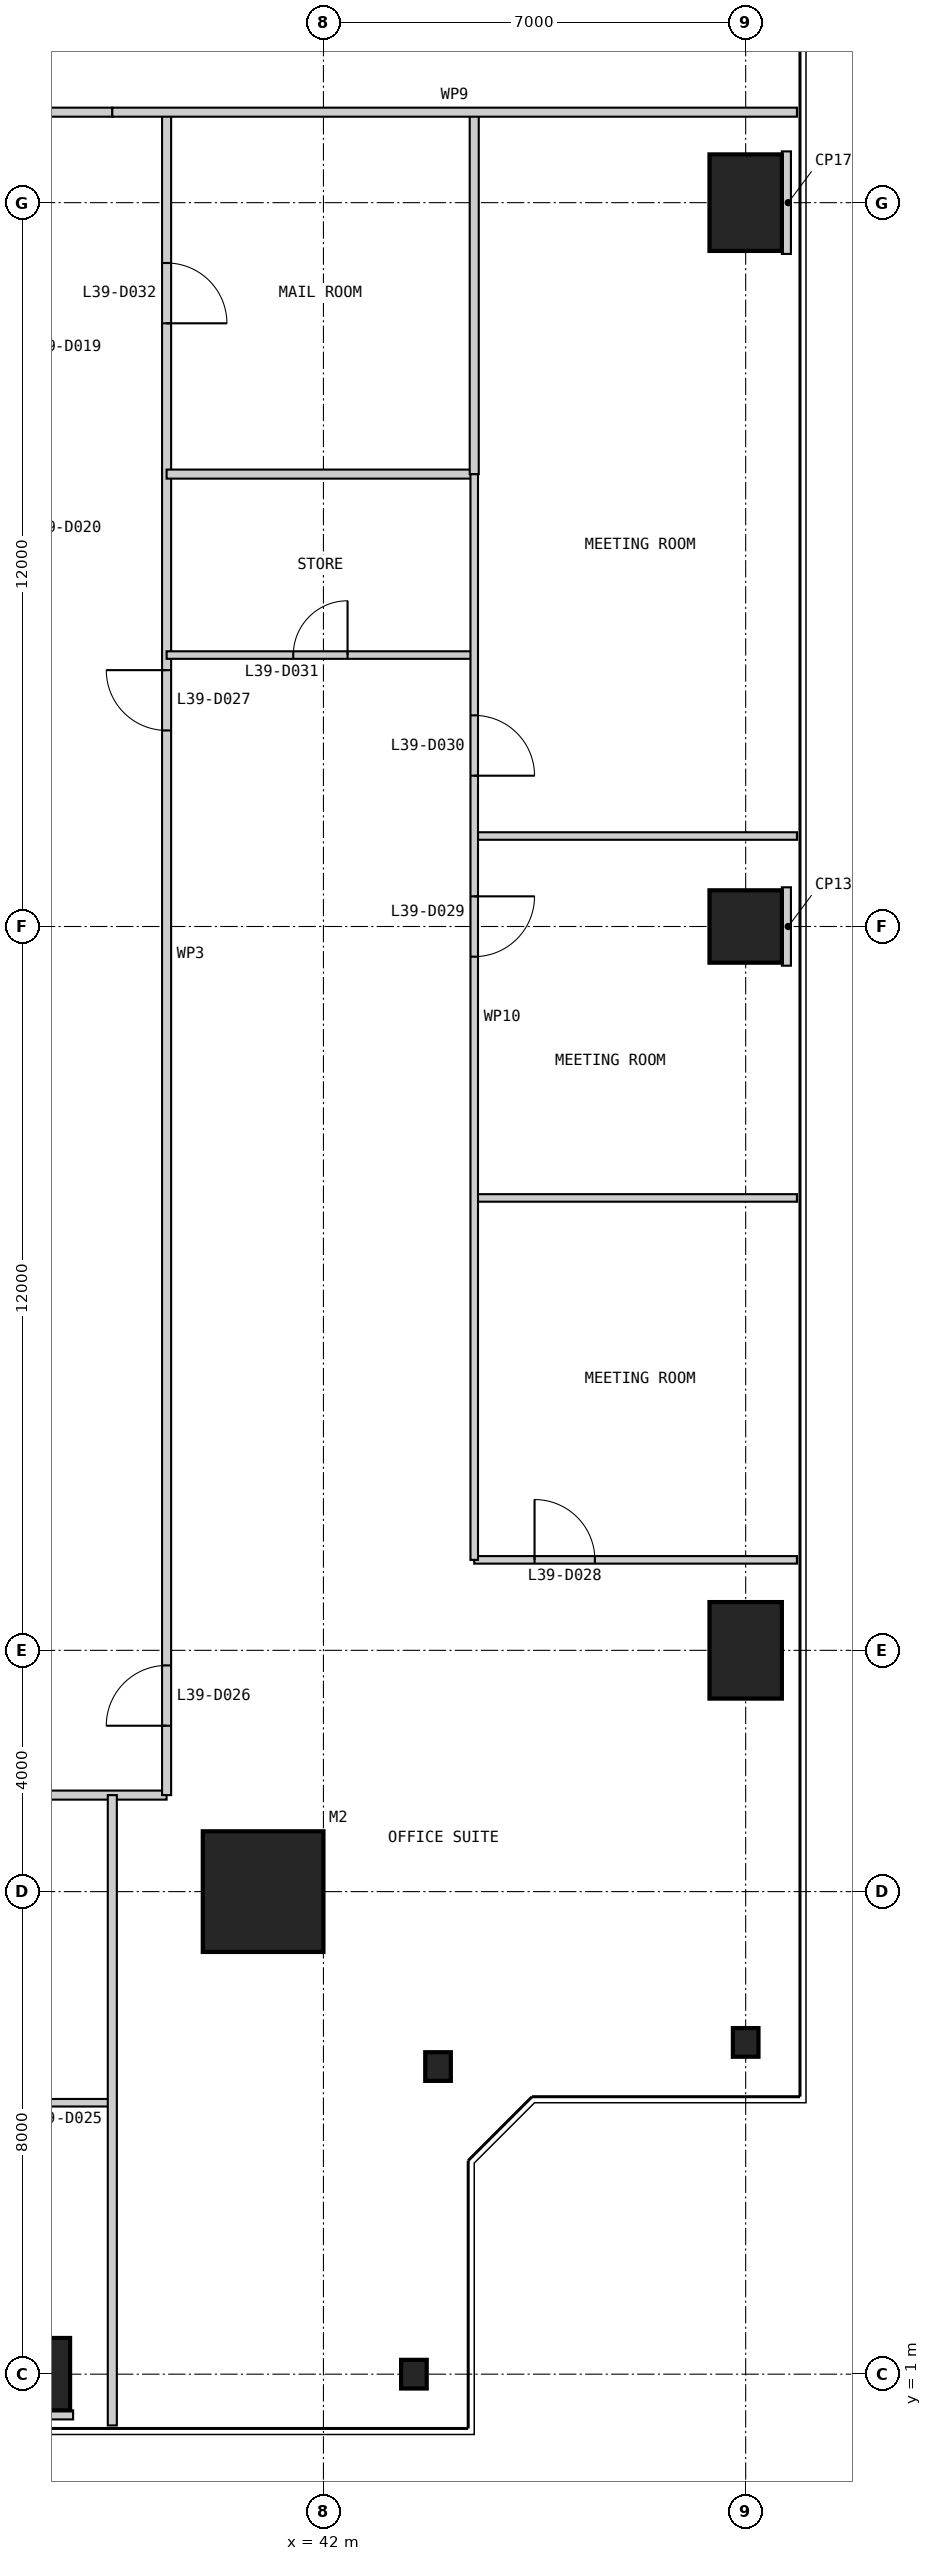
"""IFC4 building model, lengths in metres.
Left out: names, types, materials, properties, quantities, classifications, styles, units other than length and angle.
Written with IfcOpenShell. Run it as: python <this file> out.ifc"""

import sys

from ifc_helpers import new_model, si_unit, direction, frame, frame_2d, origin, origin_2d, place, context, subcontext, project, spatial, rectangle, i_section, extrude, element, fill, save


model = new_model("IFC4")
c1 = context("Model", 3, precision=1e-05, world=origin(), true_north=direction((0.0, 1.0)))
c2 = subcontext(c1, "Body", "Model", "MODEL_VIEW")
j1 = project(units=[si_unit("LENGTHUNIT", "METRE"), si_unit("PLANEANGLEUNIT", "RADIAN")], contexts=[c1])
p1 = place(None, origin())
s1 = spatial("IfcSite", under=j1, at=p1, CompositionType="ELEMENT")
p2 = place(p1, origin())
s2 = spatial("IfcBuilding", under=s1, at=p2, CompositionType="ELEMENT")
p3 = place(p2, frame((0.0, 0.0, 168.4)))
s3 = spatial("IfcBuildingStorey", under=s2, at=p3, CompositionType="ELEMENT", Elevation=168.4)
p4 = place(p3, frame((41.0, 9.0, 0.0), z_axis=(0.0, 0.0, 1.0), x_axis=(1.0, 0.0, 0.0)))
e1 = element("IfcColumn", 1, at=p4, inside=s3, PredefinedType="COLUMN", context=c2, shape_type="SweptSolid", body=[
    extrude(rectangle(XDim=2.0, YDim=2.0, at=origin_2d()), origin(), (0.0, 0.0, 1.0), 5.4),
])
p5 = place(p3, frame((37.0, 1.0, 0.0), z_axis=(0.0, 0.0, 1.0), x_axis=(1.0, 0.0, 0.0)))
e2 = element("IfcColumn", 2, at=p5, inside=s3, PredefinedType="COLUMN", context=c2, shape_type="SweptSolid", body=[
    extrude(rectangle(XDim=1.6, YDim=1.2, at=origin_2d()), origin(), (0.0, 0.0, 1.0), 5.4),
])
for number, where, z_axis, x_axis in (
    (3, (43.5, 1.0, 0.0), (0.0, 0.0, 1.0), (1.0, 0.0, 0.0)),
    (4, (43.9, 6.1, 0.0), (0.0, 0.0, 1.0), (1.0, 0.0, 0.0)),
    (5, (49.0, 6.5, 0.0), (0.0, 0.0, 1.0), (1.0, 0.0, 0.0)),
):
    element("IfcColumn", number, at=place(p3, frame(where, z_axis=z_axis, x_axis=x_axis)), inside=s3, PredefinedType="COLUMN", context=c2, shape_type="SweptSolid", body=[
        extrude(i_section(OverallWidth=0.424, OverallDepth=0.475, WebThickness=0.048, FlangeThickness=0.077, at=origin_2d()), origin(), (0.0, 0.0, 1.0), 5.4),
    ])
p6 = place(p3, frame((49.0, 13.0, 0.0), z_axis=(0.0, 0.0, 1.0), x_axis=(1.0, 0.0, 0.0)))
e6 = element("IfcColumn", 6, at=p6, inside=s3, PredefinedType="COLUMN", context=c2, shape_type="SweptSolid", body=[
    extrude(rectangle(XDim=1.2, YDim=1.6, at=origin_2d()), origin(), (0.0, 0.0, 1.0), 5.4),
])
p7 = place(p3, frame((49.0, 25.0, 0.0), z_axis=(0.0, 0.0, 1.0), x_axis=(1.0, 0.0, 0.0)))
e7 = element("IfcColumn", 7, at=p7, inside=s3, PredefinedType="COLUMN", context=c2, shape_type="SweptSolid", body=[
    extrude(rectangle(XDim=1.2, YDim=1.2, at=origin_2d()), origin(), (0.0, 0.0, 1.0), 5.4),
])
p8 = place(p3, frame((49.0, 37.0, 0.0), z_axis=(0.0, 0.0, 1.0), x_axis=(1.0, 0.0, 0.0)))
e8 = element("IfcColumn", 8, at=p8, inside=s3, PredefinedType="COLUMN", context=c2, shape_type="SweptSolid", body=[
    extrude(rectangle(XDim=1.2, YDim=1.6, at=origin_2d()), origin(), (0.0, 0.0, 1.0), 5.4),
])
p9 = place(p3, frame((10.6, 10.6, 0.0), z_axis=(0.0, 0.0, 1.0), x_axis=(1.0, 0.0, 0.0)))
e9 = element("IfcWall", 9, at=p9, inside=s3, PredefinedType="PARTITIONING", context=c2, shape_type="SweptSolid", body=[
    extrude(rectangle(XDim=28.8, YDim=0.15, at=frame_2d((14.4, 0.0))), origin(), (0.0, 0.0, 1.0), 5.25),
])
p10 = place(p9, frame((1.15, 0.0, 0.0)))
e10 = element("IfcOpeningElement", 10, at=p10, cuts=e9, PredefinedType="OPENING", context=c2, shape_type="SweptSolid", body=[
    extrude(rectangle(XDim=1.0, YDim=2.2, at=frame_2d((0.5, 1.1))), frame((0.0, 0.085, 0.0), z_axis=(0.0, -1.0, 0.0), x_axis=(1.0, 0.0, 0.0)), (0.0, 0.0, 1.0), 0.17),
])
p11 = place(p9, frame((11.65, 0.0, 0.0)))
e11 = element("IfcOpeningElement", 11, at=p11, cuts=e9, PredefinedType="OPENING", context=c2, shape_type="SweptSolid", body=[
    extrude(rectangle(XDim=1.0, YDim=2.2, at=frame_2d((0.5, 1.1))), frame((0.0, 0.085, 0.0), z_axis=(0.0, -1.0, 0.0), x_axis=(1.0, 0.0, 0.0)), (0.0, 0.0, 1.0), 0.17),
])
p12 = place(p9, frame((16.9, 0.0, 0.0)))
e12 = element("IfcOpeningElement", 12, at=p12, cuts=e9, PredefinedType="OPENING", context=c2, shape_type="SweptSolid", body=[
    extrude(rectangle(XDim=1.0, YDim=2.2, at=frame_2d((0.5, 1.1))), frame((0.0, 0.085, 0.0), z_axis=(0.0, -1.0, 0.0), x_axis=(1.0, 0.0, 0.0)), (0.0, 0.0, 1.0), 0.17),
])
p13 = place(p3, frame((32.5, 5.5, 0.0), z_axis=(0.0, 0.0, 1.0), x_axis=(1.0, 0.0, 0.0)))
e13 = element("IfcWall", 13, at=p13, inside=s3, PredefinedType="PARTITIONING", context=c2, shape_type="SweptSolid", body=[
    extrude(rectangle(XDim=6.0, YDim=0.125, at=frame_2d((3.0, 0.0))), origin(), (0.0, 0.0, 1.0), 5.25),
])
p14 = place(p13, frame((4.05, 0.0, 0.0)))
e14 = element("IfcOpeningElement", 14, at=p14, cuts=e13, PredefinedType="OPENING", context=c2, shape_type="SweptSolid", body=[
    extrude(rectangle(XDim=0.9, YDim=2.2, at=frame_2d((0.45, 1.1))), frame((0.0, 0.073, 0.0), z_axis=(0.0, -1.0, 0.0), x_axis=(1.0, 0.0, 0.0)), (0.0, 0.0, 1.0), 0.145),
])
p15 = place(p3, frame((39.4, 10.6, 0.0), z_axis=(0.0, 0.0, 1.0), x_axis=(0.0, 1.0, 0.0)))
e15 = element("IfcWall", 15, at=p15, inside=s3, PredefinedType="PARTITIONING", context=c2, shape_type="SweptSolid", body=[
    extrude(rectangle(XDim=27.9, YDim=0.15, at=frame_2d((13.95, 0.0))), origin(), (0.0, 0.0, 1.0), 5.25),
])
p16 = place(p15, frame((1.15, 0.0, 0.0)))
e16 = element("IfcOpeningElement", 16, at=p16, cuts=e15, PredefinedType="OPENING", context=c2, shape_type="SweptSolid", body=[
    extrude(rectangle(XDim=1.0, YDim=2.2, at=frame_2d((0.5, 1.1))), frame((0.0, 0.085, 0.0), z_axis=(0.0, -1.0, 0.0), x_axis=(1.0, 0.0, 0.0)), (0.0, 0.0, 1.0), 0.17),
])
p17 = place(p15, frame((17.65, 0.0, 0.0)))
e17 = element("IfcOpeningElement", 17, at=p17, cuts=e15, PredefinedType="OPENING", context=c2, shape_type="SweptSolid", body=[
    extrude(rectangle(XDim=1.0, YDim=2.2, at=frame_2d((0.5, 1.1))), frame((0.0, 0.085, 0.0), z_axis=(0.0, -1.0, 0.0), x_axis=(1.0, 0.0, 0.0)), (0.0, 0.0, 1.0), 0.17),
])
p18 = place(p15, frame((24.4, 0.0, 0.0)))
e18 = element("IfcOpeningElement", 18, at=p18, cuts=e15, PredefinedType="OPENING", context=c2, shape_type="SweptSolid", body=[
    extrude(rectangle(XDim=1.0, YDim=2.2, at=frame_2d((0.5, 1.1))), frame((0.0, 0.085, 0.0), z_axis=(0.0, -1.0, 0.0), x_axis=(1.0, 0.0, 0.0)), (0.0, 0.0, 1.0), 0.17),
])
p19 = place(p3, frame((38.5, 0.15, 0.0), z_axis=(0.0, 0.0, 1.0), x_axis=(0.0, 1.0, 0.0)))
e19 = element("IfcWall", 19, at=p19, inside=s3, PredefinedType="PARTITIONING", context=c2, shape_type="SweptSolid", body=[
    extrude(rectangle(XDim=10.45, YDim=0.15, at=frame_2d((5.225, 0.0))), origin(), (0.0, 0.0, 1.0), 5.25),
])
p20 = place(p3, frame((49.85, 14.5, 0.0), z_axis=(0.0, 0.0, 1.0), x_axis=(-1.0, 0.0, 0.0)))
e20 = element("IfcWall", 20, at=p20, inside=s3, PredefinedType="PARTITIONING", context=c2, shape_type="SweptSolid", body=[
    extrude(rectangle(XDim=5.35, YDim=0.125, at=frame_2d((2.675, 0.0))), origin(), (0.0, 0.0, 1.0), 5.25),
])
p21 = place(p20, frame((3.35, 0.0, 0.0)))
e21 = element("IfcOpeningElement", 21, at=p21, cuts=e20, PredefinedType="OPENING", context=c2, shape_type="SweptSolid", body=[
    extrude(rectangle(XDim=1.0, YDim=2.2, at=frame_2d((0.5, 1.1))), frame((0.0, 0.073, 0.0), z_axis=(0.0, -1.0, 0.0), x_axis=(1.0, 0.0, 0.0)), (0.0, 0.0, 1.0), 0.145),
])
for number, where, z_axis, x_axis in (
    (22, (49.85, 20.5, 0.0), (0.0, 0.0, 1.0), (-1.0, 0.0, 0.0)),
    (23, (49.85, 26.5, 0.0), (0.0, 0.0, 1.0), (-1.0, 0.0, 0.0)),
):
    element("IfcWall", number, at=place(p3, frame(where, z_axis=z_axis, x_axis=x_axis)), inside=s3, PredefinedType="PARTITIONING", context=c2, shape_type="SweptSolid", body=[
        extrude(rectangle(XDim=5.35, YDim=0.125, at=frame_2d((2.675, 0.0))), origin(), (0.0, 0.0, 1.0), 5.25),
    ])
p22 = place(p3, frame((44.5, 29.5, 0.0), z_axis=(0.0, 0.0, 1.0), x_axis=(-1.0, 0.0, 0.0)))
e24 = element("IfcWall", 24, at=p22, inside=s3, PredefinedType="PARTITIONING", context=c2, shape_type="SweptSolid", body=[
    extrude(rectangle(XDim=5.1, YDim=0.125, at=frame_2d((2.55, 0.0))), origin(), (0.0, 0.0, 1.0), 5.25),
])
p23 = place(p22, frame((2.1, 0.0, 0.0)))
e25 = element("IfcOpeningElement", 25, at=p23, cuts=e24, PredefinedType="OPENING", context=c2, shape_type="SweptSolid", body=[
    extrude(rectangle(XDim=0.9, YDim=2.2, at=frame_2d((0.45, 1.1))), frame((0.0, 0.073, 0.0), z_axis=(0.0, -1.0, 0.0), x_axis=(1.0, 0.0, 0.0)), (0.0, 0.0, 1.0), 0.145),
])
p24 = place(p3, frame((44.5, 32.5, 0.0), z_axis=(0.0, 0.0, 1.0), x_axis=(-1.0, 0.0, 0.0)))
e26 = element("IfcWall", 26, at=p24, inside=s3, PredefinedType="PARTITIONING", context=c2, shape_type="SweptSolid", body=[
    extrude(rectangle(XDim=5.1, YDim=0.15, at=frame_2d((2.55, 0.0))), origin(), (0.0, 0.0, 1.0), 5.25),
])
p25 = place(p3, frame((44.5, 14.5, 0.0), z_axis=(0.0, 0.0, 1.0), x_axis=(0.0, 1.0, 0.0)))
e27 = element("IfcWall", 27, at=p25, inside=s3, PredefinedType="PARTITIONING", context=c2, shape_type="SweptSolid", body=[
    extrude(rectangle(XDim=18.0, YDim=0.125, at=frame_2d((9.0, 0.0))), origin(), (0.0, 0.0, 1.0), 5.25),
])
p26 = place(p25, frame((10.0, 0.0, 0.0)))
e28 = element("IfcOpeningElement", 28, at=p26, cuts=e27, PredefinedType="OPENING", context=c2, shape_type="SweptSolid", body=[
    extrude(rectangle(XDim=1.0, YDim=2.2, at=frame_2d((0.5, 1.1))), frame((0.0, 0.073, 0.0), z_axis=(0.0, -1.0, 0.0), x_axis=(1.0, 0.0, 0.0)), (0.0, 0.0, 1.0), 0.145),
])
p27 = place(p25, frame((13.0, 0.0, 0.0)))
e29 = element("IfcOpeningElement", 29, at=p27, cuts=e27, PredefinedType="OPENING", context=c2, shape_type="SweptSolid", body=[
    extrude(rectangle(XDim=1.0, YDim=2.2, at=frame_2d((0.5, 1.1))), frame((0.0, 0.073, 0.0), z_axis=(0.0, -1.0, 0.0), x_axis=(1.0, 0.0, 0.0)), (0.0, 0.0, 1.0), 0.145),
])
p28 = place(p3, frame((44.5, 32.5, 0.0), z_axis=(0.0, 0.0, 1.0), x_axis=(0.0, 1.0, 0.0)))
e30 = element("IfcWall", 30, at=p28, inside=s3, PredefinedType="PARTITIONING", context=c2, shape_type="SweptSolid", body=[
    extrude(rectangle(XDim=6.0, YDim=0.15, at=frame_2d((3.0, 0.0))), origin(), (0.0, 0.0, 1.0), 5.25),
])
p29 = place(p3, frame((38.5, 38.5, 0.0), z_axis=(0.0, 0.0, 1.0), x_axis=(-1.0, 0.0, 0.0)))
e31 = element("IfcWall", 31, at=p29, inside=s3, PredefinedType="PARTITIONING", context=c2, shape_type="SweptSolid", body=[
    extrude(rectangle(XDim=27.0, YDim=0.15, at=frame_2d((13.5, 0.0))), origin(), (0.0, 0.0, 1.0), 5.25),
])
p30 = place(p29, frame((2.5, 0.0, 0.0)))
e32 = element("IfcOpeningElement", 32, at=p30, cuts=e31, PredefinedType="OPENING", context=c2, shape_type="SweptSolid", body=[
    extrude(rectangle(XDim=1.0, YDim=2.2, at=frame_2d((0.5, 1.1))), frame((0.0, 0.085, 0.0), z_axis=(0.0, -1.0, 0.0), x_axis=(1.0, 0.0, 0.0)), (0.0, 0.0, 1.0), 0.17),
])
p31 = place(p29, frame((7.0, 0.0, 0.0)))
e33 = element("IfcOpeningElement", 33, at=p31, cuts=e31, PredefinedType="OPENING", context=c2, shape_type="SweptSolid", body=[
    extrude(rectangle(XDim=1.0, YDim=2.2, at=frame_2d((0.5, 1.1))), frame((0.0, 0.085, 0.0), z_axis=(0.0, -1.0, 0.0), x_axis=(1.0, 0.0, 0.0)), (0.0, 0.0, 1.0), 0.17),
])
p32 = place(p29, frame((14.5, 0.0, 0.0)))
e34 = element("IfcOpeningElement", 34, at=p32, cuts=e31, PredefinedType="OPENING", context=c2, shape_type="SweptSolid", body=[
    extrude(rectangle(XDim=1.0, YDim=2.2, at=frame_2d((0.5, 1.1))), frame((0.0, 0.085, 0.0), z_axis=(0.0, -1.0, 0.0), x_axis=(1.0, 0.0, 0.0)), (0.0, 0.0, 1.0), 0.17),
])
p33 = place(p3, frame((49.85, 38.5, 0.0), z_axis=(0.0, 0.0, 1.0), x_axis=(-1.0, 0.0, 0.0)))
e35 = element("IfcWall", 35, at=p33, inside=s3, PredefinedType="PARTITIONING", context=c2, shape_type="SweptSolid", body=[
    extrude(rectangle(XDim=11.35, YDim=0.15, at=frame_2d((5.675, 0.0))), origin(), (0.0, 0.0, 1.0), 5.25),
])
p34 = place(p3, frame((37.0, 0.25, 0.0), z_axis=(0.0, 0.0, 1.0), x_axis=(0.0, 1.0, 0.0)))
e36 = element("IfcWall", 36, at=p34, inside=s3, PredefinedType="PARTITIONING", context=c2, shape_type="SweptSolid", body=[
    extrude(rectangle(XDim=0.15, YDim=1.7, at=frame_2d((0.075, 0.0))), origin(), (0.0, 0.0, 1.0), 5.25),
])
p35 = place(p3, frame((49.75, 25.0, 0.0), z_axis=(0.0, 0.0, 1.0), x_axis=(-1.0, 0.0, 0.0)))
e37 = element("IfcWall", 37, at=p35, inside=s3, PredefinedType="PARTITIONING", context=c2, shape_type="SweptSolid", body=[
    extrude(rectangle(XDim=0.15, YDim=1.3, at=frame_2d((0.075, 0.0))), origin(), (0.0, 0.0, 1.0), 5.25),
])
p36 = place(p3, frame((49.75, 37.0, 0.0), z_axis=(0.0, 0.0, 1.0), x_axis=(-1.0, 0.0, 0.0)))
e38 = element("IfcWall", 38, at=p36, inside=s3, PredefinedType="PARTITIONING", context=c2, shape_type="SweptSolid", body=[
    extrude(rectangle(XDim=0.15, YDim=1.7, at=frame_2d((0.075, 0.0))), origin(), (0.0, 0.0, 1.0), 5.25),
])
p37 = place(p16, origin())
e39 = element("IfcDoor", 39, at=p37, inside=s3, OperationType="SINGLE_SWING_LEFT", PredefinedType="DOOR", context=c2, shape_type="SweptSolid", body=[
    extrude(rectangle(XDim=1.0, YDim=2.2, at=frame_2d((0.5, 1.1))), frame((0.0, 0.025, 0.0), z_axis=(0.0, -1.0, 0.0), x_axis=(1.0, 0.0, 0.0)), (0.0, 0.0, 1.0), 0.05),
])
fill(e16, e39)
p38 = place(p17, origin())
e40 = element("IfcDoor", 40, at=p38, inside=s3, OperationType="SINGLE_SWING_RIGHT", PredefinedType="DOOR", context=c2, shape_type="SweptSolid", body=[
    extrude(rectangle(XDim=1.0, YDim=2.2, at=frame_2d((0.5, 1.1))), frame((0.0, 0.025, 0.0), z_axis=(0.0, -1.0, 0.0), x_axis=(1.0, 0.0, 0.0)), (0.0, 0.0, 1.0), 0.05),
])
fill(e17, e40)
p39 = place(p21, frame((1.0, 0.0, 0.0), z_axis=(0.0, 0.0, 1.0), x_axis=(-1.0, 0.0, 0.0)))
e41 = element("IfcDoor", 41, at=p39, inside=s3, OperationType="SINGLE_SWING_LEFT", PredefinedType="DOOR", context=c2, shape_type="SweptSolid", body=[
    extrude(rectangle(XDim=1.0, YDim=2.2, at=frame_2d((0.5, 1.1))), frame((0.0, 0.025, 0.0), z_axis=(0.0, -1.0, 0.0), x_axis=(1.0, 0.0, 0.0)), (0.0, 0.0, 1.0), 0.05),
])
fill(e21, e41)
p40 = place(p26, frame((1.0, 0.0, 0.0), z_axis=(0.0, 0.0, 1.0), x_axis=(-1.0, 0.0, 0.0)))
e42 = element("IfcDoor", 42, at=p40, inside=s3, OperationType="SINGLE_SWING_LEFT", PredefinedType="DOOR", context=c2, shape_type="SweptSolid", body=[
    extrude(rectangle(XDim=1.0, YDim=2.2, at=frame_2d((0.5, 1.1))), frame((0.0, 0.025, 0.0), z_axis=(0.0, -1.0, 0.0), x_axis=(1.0, 0.0, 0.0)), (0.0, 0.0, 1.0), 0.05),
])
fill(e28, e42)
p41 = place(p27, frame((1.0, 0.0, 0.0), z_axis=(0.0, 0.0, 1.0), x_axis=(-1.0, 0.0, 0.0)))
e43 = element("IfcDoor", 43, at=p41, inside=s3, OperationType="SINGLE_SWING_RIGHT", PredefinedType="DOOR", context=c2, shape_type="SweptSolid", body=[
    extrude(rectangle(XDim=1.0, YDim=2.2, at=frame_2d((0.5, 1.1))), frame((0.0, 0.025, 0.0), z_axis=(0.0, -1.0, 0.0), x_axis=(1.0, 0.0, 0.0)), (0.0, 0.0, 1.0), 0.05),
])
fill(e29, e43)
p42 = place(p23, frame((0.9, 0.0, 0.0), z_axis=(0.0, 0.0, 1.0), x_axis=(-1.0, 0.0, 0.0)))
e44 = element("IfcDoor", 44, at=p42, inside=s3, OperationType="SINGLE_SWING_RIGHT", PredefinedType="DOOR", context=c2, shape_type="SweptSolid", body=[
    extrude(rectangle(XDim=0.9, YDim=2.2, at=frame_2d((0.45, 1.1))), frame((0.0, 0.025, 0.0), z_axis=(0.0, -1.0, 0.0), x_axis=(1.0, 0.0, 0.0)), (0.0, 0.0, 1.0), 0.05),
])
fill(e25, e44)
p43 = place(p18, frame((1.0, 0.0, 0.0), z_axis=(0.0, 0.0, 1.0), x_axis=(-1.0, 0.0, 0.0)))
e45 = element("IfcDoor", 45, at=p43, inside=s3, OperationType="SINGLE_SWING_RIGHT", PredefinedType="DOOR", context=c2, shape_type="SweptSolid", body=[
    extrude(rectangle(XDim=1.0, YDim=2.2, at=frame_2d((0.5, 1.1))), frame((0.0, 0.025, 0.0), z_axis=(0.0, -1.0, 0.0), x_axis=(1.0, 0.0, 0.0)), (0.0, 0.0, 1.0), 0.05),
])
fill(e18, e45)
save(model, sys.argv[1])
